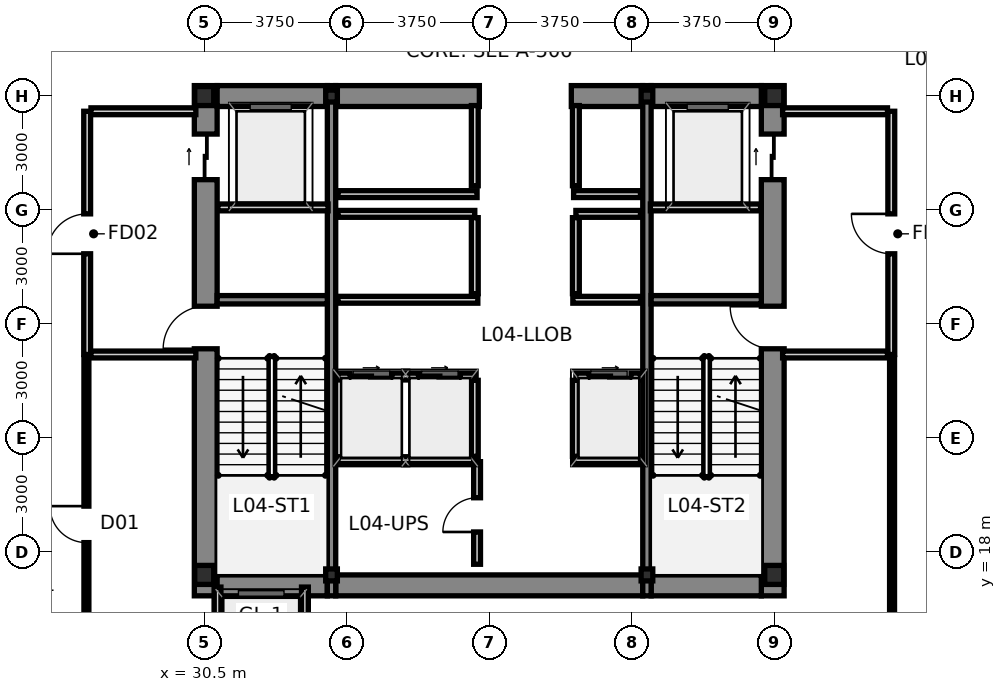
"""IFC4 building model, lengths in metres.
Left out: names, types, materials, properties, quantities, classifications, styles, units other than length and angle.
Written with IfcOpenShell. Run it as: python <this file> out.ifc"""

import sys

from ifc_helpers import new_model, si_unit, direction, frame, frame_2d, origin, origin_2d, place, context, subcontext, project, spatial, rectangle, i_section, extrude, source, transform, mapped, element, fill, save


model = new_model("IFC4")
c1 = context("Model", 3, precision=1e-05, world=origin(), true_north=direction((0.0, 1.0)))
c2 = subcontext(c1, "Body", "Model", "MODEL_VIEW")
j1 = project(units=[si_unit("LENGTHUNIT", "METRE"), si_unit("PLANEANGLEUNIT", "RADIAN")], contexts=[c1])
p1 = place(None, origin())
s1 = spatial("IfcSite", under=j1, at=p1, CompositionType="ELEMENT")
p2 = place(p1, origin())
s2 = spatial("IfcBuilding", under=s1, at=p2, CompositionType="ELEMENT")
p3 = place(p2, frame((0.0, 0.0, 18.9)))
s3 = spatial("IfcBuildingStorey", under=s2, at=p3, CompositionType="ELEMENT", Elevation=18.9)
m1 = source(origin(), c2, "Body", "SweptSolid", [
    extrude(i_section(OverallWidth=0.5, OverallDepth=0.5, WebThickness=0.028, FlangeThickness=0.04, at=origin_2d()), origin(), (0.0, 0.0, 1.0), 4.2),
])
for number, where, z_axis, x_axis in (
    (1, (30.5, 17.4, 0.0), (0.0, 0.0, 1.0), (1.0, 0.0, 0.0)),
    (2, (45.5, 17.4, 0.0), (0.0, 0.0, 1.0), (1.0, 0.0, 0.0)),
    (3, (45.5, 30.0, 0.0), (0.0, 0.0, 1.0), (1.0, 0.0, 0.0)),
    (4, (30.5, 30.0, 0.0), (0.0, 0.0, 1.0), (1.0, 0.0, 0.0)),
):
    element("IfcColumn", number, at=place(p3, frame(where, z_axis=z_axis, x_axis=x_axis)), inside=s3, PredefinedType="COLUMN", context=c2, shape_type="MappedRepresentation", body=[
        mapped(m1, transform((0.0, 0.0, 0.0), scale=1.0)),
    ])
m2 = source(origin(), c2, "Body", "SweptSolid", [
    extrude(i_section(OverallWidth=0.307, OverallDepth=0.315, WebThickness=0.012, FlangeThickness=0.019, at=origin_2d()), origin(), (0.0, 0.0, 1.0), 4.2),
])
for number, where, z_axis, x_axis in (
    (5, (33.85, 17.4, 0.0), (0.0, 0.0, 1.0), (1.0, 0.0, 0.0)),
    (6, (42.15, 17.4, 0.0), (0.0, 0.0, 1.0), (1.0, 0.0, 0.0)),
    (7, (33.85, 30.0, 0.0), (0.0, 0.0, 1.0), (1.0, 0.0, 0.0)),
    (8, (42.15, 30.0, 0.0), (0.0, 0.0, 1.0), (1.0, 0.0, 0.0)),
):
    element("IfcColumn", number, at=place(p3, frame(where, z_axis=z_axis, x_axis=x_axis)), inside=s3, PredefinedType="COLUMN", context=c2, shape_type="MappedRepresentation", body=[
        mapped(m2, transform((0.0, 0.0, 0.0), scale=1.0)),
    ])
p4 = place(p3, frame((30.54, 16.85, 0.0), z_axis=(0.0, 0.0, 1.0), x_axis=(0.0, 1.0, 0.0)))
e9 = element("IfcWall", 9, at=p4, inside=s3, PredefinedType="SHEAR", context=c2, shape_type="SweptSolid", body=[
    extrude(rectangle(XDim=13.425, YDim=0.6, at=frame_2d((6.712, 0.0))), origin(), (0.0, 0.0, 1.0), 4.2),
])
p5 = place(p4, frame((6.5, 0.0, 0.0)))
e10 = element("IfcOpeningElement", 10, at=p5, cuts=e9, PredefinedType="OPENING", context=c2, shape_type="SweptSolid", body=[
    extrude(rectangle(XDim=1.12, YDim=2.15, at=frame_2d((0.56, 1.075))), frame((0.0, 0.312, 0.0), z_axis=(0.0, -1.0, 0.0), x_axis=(1.0, 0.0, 0.0)), (0.0, 0.0, 1.0), 0.624),
])
p6 = place(p4, frame((10.95, 0.0, 0.0)))
e11 = element("IfcOpeningElement", 11, at=p6, cuts=e9, PredefinedType="OPENING", context=c2, shape_type="SweptSolid", body=[
    extrude(rectangle(XDim=1.2, YDim=2.2, at=frame_2d((0.6, 1.1))), frame((0.0, 0.312, 0.0), z_axis=(0.0, -1.0, 0.0), x_axis=(1.0, 0.0, 0.0)), (0.0, 0.0, 1.0), 0.624),
])
p7 = place(p3, frame((45.46, 16.85, 0.0), z_axis=(0.0, 0.0, 1.0), x_axis=(0.0, 1.0, 0.0)))
e12 = element("IfcWall", 12, at=p7, inside=s3, PredefinedType="SHEAR", context=c2, shape_type="SweptSolid", body=[
    extrude(rectangle(XDim=13.425, YDim=0.6, at=frame_2d((6.712, 0.0))), origin(), (0.0, 0.0, 1.0), 4.2),
])
p8 = place(p7, frame((6.5, 0.0, 0.0)))
e13 = element("IfcOpeningElement", 13, at=p8, cuts=e12, PredefinedType="OPENING", context=c2, shape_type="SweptSolid", body=[
    extrude(rectangle(XDim=1.12, YDim=2.15, at=frame_2d((0.56, 1.075))), frame((0.0, 0.312, 0.0), z_axis=(0.0, -1.0, 0.0), x_axis=(1.0, 0.0, 0.0)), (0.0, 0.0, 1.0), 0.624),
])
p9 = place(p7, frame((10.95, 0.0, 0.0)))
e14 = element("IfcOpeningElement", 14, at=p9, cuts=e12, PredefinedType="OPENING", context=c2, shape_type="SweptSolid", body=[
    extrude(rectangle(XDim=1.2, YDim=2.2, at=frame_2d((0.6, 1.1))), frame((0.0, 0.312, 0.0), z_axis=(0.0, -1.0, 0.0), x_axis=(1.0, 0.0, 0.0)), (0.0, 0.0, 1.0), 0.624),
])
p10 = place(p3, frame((30.84, 17.125, 0.0), z_axis=(0.0, 0.0, 1.0), x_axis=(1.0, 0.0, 0.0)))
e15 = element("IfcWall", 15, at=p10, inside=s3, PredefinedType="SHEAR", context=c2, shape_type="SweptSolid", body=[
    extrude(rectangle(XDim=2.9, YDim=0.55, at=frame_2d((1.45, 0.0))), origin(), (0.0, 0.0, 1.0), 4.2),
])
p11 = place(p3, frame((33.96, 17.125, 0.0), z_axis=(0.0, 0.0, 1.0), x_axis=(1.0, 0.0, 0.0)))
e16 = element("IfcWall", 16, at=p11, inside=s3, PredefinedType="SHEAR", context=c2, shape_type="SweptSolid", body=[
    extrude(rectangle(XDim=8.08, YDim=0.55, at=frame_2d((4.04, 0.0))), origin(), (0.0, 0.0, 1.0), 4.2),
])
for number, where, z_axis, x_axis in (
    (17, (42.26, 17.125, 0.0), (0.0, 0.0, 1.0), (1.0, 0.0, 0.0)),
    (18, (30.84, 30.0, 0.0), (0.0, 0.0, 1.0), (1.0, 0.0, 0.0)),
):
    element("IfcWall", number, at=place(p3, frame(where, z_axis=z_axis, x_axis=x_axis)), inside=s3, PredefinedType="SHEAR", context=c2, shape_type="SweptSolid", body=[
        extrude(rectangle(XDim=2.9, YDim=0.55, at=frame_2d((1.45, 0.0))), origin(), (0.0, 0.0, 1.0), 4.2),
    ])
p12 = place(p3, frame((33.96, 30.0, 0.0), z_axis=(0.0, 0.0, 1.0), x_axis=(1.0, 0.0, 0.0)))
e19 = element("IfcWall", 19, at=p12, inside=s3, PredefinedType="SHEAR", context=c2, shape_type="SweptSolid", body=[
    extrude(rectangle(XDim=3.78, YDim=0.55, at=frame_2d((1.89, 0.0))), origin(), (0.0, 0.0, 1.0), 4.2),
])
p13 = place(p3, frame((40.16, 30.0, 0.0), z_axis=(0.0, 0.0, 1.0), x_axis=(1.0, 0.0, 0.0)))
e20 = element("IfcWall", 20, at=p13, inside=s3, PredefinedType="SHEAR", context=c2, shape_type="SweptSolid", body=[
    extrude(rectangle(XDim=1.88, YDim=0.55, at=frame_2d((0.94, 0.0))), origin(), (0.0, 0.0, 1.0), 4.2),
])
p14 = place(p3, frame((42.26, 30.0, 0.0), z_axis=(0.0, 0.0, 1.0), x_axis=(1.0, 0.0, 0.0)))
e21 = element("IfcWall", 21, at=p14, inside=s3, PredefinedType="SHEAR", context=c2, shape_type="SweptSolid", body=[
    extrude(rectangle(XDim=2.9, YDim=0.55, at=frame_2d((1.45, 0.0))), origin(), (0.0, 0.0, 1.0), 4.2),
])
for number, where, z_axis, x_axis in (
    (22, (33.85, 16.85, 0.0), (0.0, 0.0, 1.0), (0.0, 1.0, 0.0)),
    (23, (42.15, 16.85, 0.0), (0.0, 0.0, 1.0), (0.0, 1.0, 0.0)),
):
    element("IfcWall", number, at=place(p3, frame(where, z_axis=z_axis, x_axis=x_axis)), inside=s3, PredefinedType="SHEAR", context=c2, shape_type="SweptSolid", body=[
        extrude(rectangle(XDim=13.425, YDim=0.22, at=frame_2d((6.712, 0.0))), origin(), (0.0, 0.0, 1.0), 4.2),
    ])
for number, where, z_axis, x_axis in (
    (24, (30.84, 24.64, 0.0), (0.0, 0.0, 1.0), (1.0, 0.0, 0.0)),
    (25, (42.26, 24.64, 0.0), (0.0, 0.0, 1.0), (1.0, 0.0, 0.0)),
):
    element("IfcWall", number, at=place(p3, frame(where, z_axis=z_axis, x_axis=x_axis)), inside=s3, PredefinedType="SHEAR", context=c2, shape_type="SweptSolid", body=[
        extrude(rectangle(XDim=2.9, YDim=0.22, at=frame_2d((1.45, 0.0))), origin(), (0.0, 0.0, 1.0), 4.2),
    ])
p15 = place(p3, frame((30.85, 14.42, 0.0), z_axis=(0.0, 0.0, 1.0), x_axis=(0.0, 1.0, 0.0)))
e26 = element("IfcWall", 26, at=p15, inside=s3, PredefinedType="PARTITIONING", context=c2, shape_type="SweptSolid", body=[
    extrude(rectangle(XDim=2.66, YDim=0.18, at=frame_2d((1.33, 0.0))), origin(), (0.0, 0.0, 1.0), 3.124),
])
p16 = place(p3, frame((33.15, 14.42, 0.0), z_axis=(0.0, 0.0, 1.0), x_axis=(0.0, 1.0, 0.0)))
e27 = element("IfcWall", 27, at=p16, inside=s3, PredefinedType="PARTITIONING", context=c2, shape_type="SweptSolid", body=[
    extrude(rectangle(XDim=2.66, YDim=0.18, at=frame_2d((1.33, 0.0))), origin(), (0.0, 0.0, 1.0), 3.75),
])
p17 = place(p3, frame((34.02, 22.62, 0.0), z_axis=(0.0, 0.0, 1.0), x_axis=(1.0, 0.0, 0.0)))
e28 = element("IfcWall", 28, at=p17, inside=s3, PredefinedType="PARTITIONING", context=c2, shape_type="SweptSolid", body=[
    extrude(rectangle(XDim=3.6, YDim=0.18, at=frame_2d((1.8, 0.0))), origin(), (0.0, 0.0, 1.0), 3.75),
])
p18 = place(p17, frame((0.32, 0.0, 0.0)))
e29 = element("IfcOpeningElement", 29, at=p18, cuts=e28, PredefinedType="OPENING", context=c2, shape_type="SweptSolid", body=[
    extrude(rectangle(XDim=1.1, YDim=2.2, at=frame_2d((0.55, 1.1))), frame((0.0, 0.102, 0.0), z_axis=(0.0, -1.0, 0.0), x_axis=(1.0, 0.0, 0.0)), (0.0, 0.0, 1.0), 0.204),
])
p19 = place(p17, frame((2.12, 0.0, 0.0)))
e30 = element("IfcOpeningElement", 30, at=p19, cuts=e28, PredefinedType="OPENING", context=c2, shape_type="SweptSolid", body=[
    extrude(rectangle(XDim=1.1, YDim=2.2, at=frame_2d((0.55, 1.1))), frame((0.0, 0.102, 0.0), z_axis=(0.0, -1.0, 0.0), x_axis=(1.0, 0.0, 0.0)), (0.0, 0.0, 1.0), 0.204),
])
p20 = place(p3, frame((40.28, 22.62, 0.0), z_axis=(0.0, 0.0, 1.0), x_axis=(1.0, 0.0, 0.0)))
e31 = element("IfcWall", 31, at=p20, inside=s3, PredefinedType="PARTITIONING", context=c2, shape_type="SweptSolid", body=[
    extrude(rectangle(XDim=1.7, YDim=0.18, at=frame_2d((0.85, 0.0))), origin(), (0.0, 0.0, 1.0), 3.75),
])
p21 = place(p20, frame((0.35, 0.0, 0.0)))
e32 = element("IfcOpeningElement", 32, at=p21, cuts=e31, PredefinedType="OPENING", context=c2, shape_type="SweptSolid", body=[
    extrude(rectangle(XDim=1.1, YDim=2.2, at=frame_2d((0.55, 1.1))), frame((0.0, 0.102, 0.0), z_axis=(0.0, -1.0, 0.0), x_axis=(1.0, 0.0, 0.0)), (0.0, 0.0, 1.0), 0.204),
])
for number, where, z_axis, x_axis in (
    (33, (37.62, 20.52, 0.0), (0.0, 0.0, 1.0), (0.0, 1.0, 0.0)),
    (34, (40.28, 20.52, 0.0), (0.0, 0.0, 1.0), (0.0, 1.0, 0.0)),
):
    element("IfcWall", number, at=place(p3, frame(where, z_axis=z_axis, x_axis=x_axis)), inside=s3, PredefinedType="PARTITIONING", context=c2, shape_type="SweptSolid", body=[
        extrude(rectangle(XDim=2.0, YDim=0.18, at=frame_2d((1.0, 0.0))), origin(), (0.0, 0.0, 1.0), 3.75),
    ])
p22 = place(p3, frame((34.02, 26.9, 0.0), z_axis=(0.0, 0.0, 1.0), x_axis=(1.0, 0.0, 0.0)))
e35 = element("IfcWall", 35, at=p22, inside=s3, PredefinedType="PARTITIONING", context=c2, shape_type="SweptSolid", body=[
    extrude(rectangle(XDim=3.6, YDim=0.18, at=frame_2d((1.8, 0.0))), origin(), (0.0, 0.0, 1.0), 3.75),
])
p23 = place(p3, frame((40.28, 26.9, 0.0), z_axis=(0.0, 0.0, 1.0), x_axis=(1.0, 0.0, 0.0)))
e36 = element("IfcWall", 36, at=p23, inside=s3, PredefinedType="PARTITIONING", context=c2, shape_type="SweptSolid", body=[
    extrude(rectangle(XDim=1.7, YDim=0.18, at=frame_2d((0.85, 0.0))), origin(), (0.0, 0.0, 1.0), 3.75),
])
for number, where, z_axis, x_axis in (
    (37, (37.62, 24.8, 0.0), (0.0, 0.0, 1.0), (0.0, 1.0, 0.0)),
    (38, (40.28, 24.8, 0.0), (0.0, 0.0, 1.0), (0.0, 1.0, 0.0)),
):
    element("IfcWall", number, at=place(p3, frame(where, z_axis=z_axis, x_axis=x_axis)), inside=s3, PredefinedType="PARTITIONING", context=c2, shape_type="SweptSolid", body=[
        extrude(rectangle(XDim=2.0, YDim=0.18, at=frame_2d((1.0, 0.0))), origin(), (0.0, 0.0, 1.0), 3.75),
    ])
p24 = place(p3, frame((34.02, 24.64, 0.0), z_axis=(0.0, 0.0, 1.0), x_axis=(1.0, 0.0, 0.0)))
e39 = element("IfcWall", 39, at=p24, inside=s3, PredefinedType="PARTITIONING", context=c2, shape_type="SweptSolid", body=[
    extrude(rectangle(XDim=3.68, YDim=0.18, at=frame_2d((1.84, 0.0))), origin(), (0.0, 0.0, 1.0), 3.75),
])
p25 = place(p3, frame((40.2, 24.64, 0.0), z_axis=(0.0, 0.0, 1.0), x_axis=(1.0, 0.0, 0.0)))
e40 = element("IfcWall", 40, at=p25, inside=s3, PredefinedType="PARTITIONING", context=c2, shape_type="SweptSolid", body=[
    extrude(rectangle(XDim=1.78, YDim=0.18, at=frame_2d((0.89, 0.0))), origin(), (0.0, 0.0, 1.0), 3.75),
])
p26 = place(p3, frame((34.02, 27.42, 0.0), z_axis=(0.0, 0.0, 1.0), x_axis=(1.0, 0.0, 0.0)))
e41 = element("IfcWall", 41, at=p26, inside=s3, PredefinedType="PARTITIONING", context=c2, shape_type="SweptSolid", body=[
    extrude(rectangle(XDim=3.66, YDim=0.18, at=frame_2d((1.83, 0.0))), origin(), (0.0, 0.0, 1.0), 3.75),
])
p27 = place(p3, frame((40.22, 27.42, 0.0), z_axis=(0.0, 0.0, 1.0), x_axis=(1.0, 0.0, 0.0)))
e42 = element("IfcWall", 42, at=p27, inside=s3, PredefinedType="PARTITIONING", context=c2, shape_type="SweptSolid", body=[
    extrude(rectangle(XDim=1.76, YDim=0.18, at=frame_2d((0.88, 0.0))), origin(), (0.0, 0.0, 1.0), 3.75),
])
for number, where, z_axis, x_axis in (
    (43, (37.62, 27.64, 0.0), (0.0, 0.0, 1.0), (0.0, 1.0, 0.0)),
    (44, (40.28, 27.64, 0.0), (0.0, 0.0, 1.0), (0.0, 1.0, 0.0)),
):
    element("IfcWall", number, at=place(p3, frame(where, z_axis=z_axis, x_axis=x_axis)), inside=s3, PredefinedType="PARTITIONING", context=c2, shape_type="SweptSolid", body=[
        extrude(rectangle(XDim=2.11, YDim=0.18, at=frame_2d((1.055, 0.0))), origin(), (0.0, 0.0, 1.0), 3.75),
    ])
p28 = place(p3, frame((27.42, 23.2, 0.0), z_axis=(0.0, 0.0, 1.0), x_axis=(0.0, 1.0, 0.0)))
e45 = element("IfcWall", 45, at=p28, inside=s3, PredefinedType="PARTITIONING", context=c2, shape_type="SweptSolid", body=[
    extrude(rectangle(XDim=6.4, YDim=0.18, at=frame_2d((3.2, 0.0))), origin(), (0.0, 0.0, 1.0), 3.376),
])
p29 = place(p28, frame((2.65, 0.0, 0.0)))
e46 = element("IfcOpeningElement", 46, at=p29, cuts=e45, PredefinedType="OPENING", context=c2, shape_type="SweptSolid", body=[
    extrude(rectangle(XDim=1.05, YDim=2.15, at=frame_2d((0.525, 1.075))), frame((0.0, 0.102, 0.0), z_axis=(0.0, -1.0, 0.0), x_axis=(1.0, 0.0, 0.0)), (0.0, 0.0, 1.0), 0.204),
])
p30 = place(p3, frame((27.52, 23.2, 0.0), z_axis=(0.0, 0.0, 1.0), x_axis=(1.0, 0.0, 0.0)))
e47 = element("IfcWall", 47, at=p30, inside=s3, PredefinedType="PARTITIONING", context=c2, shape_type="SweptSolid", body=[
    extrude(rectangle(XDim=2.76, YDim=0.18, at=frame_2d((1.38, 0.0))), origin(), (0.0, 0.0, 1.0), 3.75),
])
p31 = place(p3, frame((27.52, 29.6, 0.0), z_axis=(0.0, 0.0, 1.0), x_axis=(1.0, 0.0, 0.0)))
e48 = element("IfcWall", 48, at=p31, inside=s3, PredefinedType="PARTITIONING", context=c2, shape_type="SweptSolid", body=[
    extrude(rectangle(XDim=2.76, YDim=0.18, at=frame_2d((1.38, 0.0))), origin(), (0.0, 0.0, 1.0), 3.124),
])
p32 = place(p3, frame((48.58, 23.2, 0.0), z_axis=(0.0, 0.0, 1.0), x_axis=(0.0, 1.0, 0.0)))
e49 = element("IfcWall", 49, at=p32, inside=s3, PredefinedType="PARTITIONING", context=c2, shape_type="SweptSolid", body=[
    extrude(rectangle(XDim=6.4, YDim=0.18, at=frame_2d((3.2, 0.0))), origin(), (0.0, 0.0, 1.0), 3.75),
])
p33 = place(p32, frame((2.65, 0.0, 0.0)))
e50 = element("IfcOpeningElement", 50, at=p33, cuts=e49, PredefinedType="OPENING", context=c2, shape_type="SweptSolid", body=[
    extrude(rectangle(XDim=1.05, YDim=2.15, at=frame_2d((0.525, 1.075))), frame((0.0, 0.102, 0.0), z_axis=(0.0, -1.0, 0.0), x_axis=(1.0, 0.0, 0.0)), (0.0, 0.0, 1.0), 0.204),
])
p34 = place(p3, frame((45.72, 23.2, 0.0), z_axis=(0.0, 0.0, 1.0), x_axis=(1.0, 0.0, 0.0)))
e51 = element("IfcWall", 51, at=p34, inside=s3, PredefinedType="PARTITIONING", context=c2, shape_type="SweptSolid", body=[
    extrude(rectangle(XDim=2.76, YDim=0.18, at=frame_2d((1.38, 0.0))), origin(), (0.0, 0.0, 1.0), 3.75),
])
p35 = place(p3, frame((45.72, 29.6, 0.0), z_axis=(0.0, 0.0, 1.0), x_axis=(1.0, 0.0, 0.0)))
e52 = element("IfcWall", 52, at=p35, inside=s3, PredefinedType="PARTITIONING", context=c2, shape_type="SweptSolid", body=[
    extrude(rectangle(XDim=2.76, YDim=0.18, at=frame_2d((1.38, 0.0))), origin(), (0.0, 0.0, 1.0), 3.124),
])
for number, where, z_axis, x_axis in (
    (53, (30.86, 27.07, 0.0), (0.0, 0.0, 1.0), (1.0, 0.0, 0.0)),
    (54, (42.24, 27.07, 0.0), (0.0, 0.0, 1.0), (1.0, 0.0, 0.0)),
):
    element("IfcWall", number, at=place(p3, frame(where, z_axis=z_axis, x_axis=x_axis)), inside=s3, PredefinedType="PARTITIONING", context=c2, shape_type="SweptSolid", body=[
        extrude(rectangle(XDim=2.9, YDim=0.18, at=frame_2d((1.45, 0.0))), origin(), (0.0, 0.0, 1.0), 3.75),
    ])
p36 = place(p3, frame((34.02, 20.42, 0.0), z_axis=(0.0, 0.0, 1.0), x_axis=(1.0, 0.0, 0.0)))
e55 = element("IfcWall", 55, at=p36, inside=s3, PredefinedType="PARTITIONING", context=c2, shape_type="SweptSolid", body=[
    extrude(rectangle(XDim=3.64, YDim=0.18, at=frame_2d((1.82, 0.0))), origin(), (0.0, 0.0, 1.0), 3.75),
])
p37 = place(p3, frame((40.22, 20.42, 0.0), z_axis=(0.0, 0.0, 1.0), x_axis=(1.0, 0.0, 0.0)))
e56 = element("IfcWall", 56, at=p37, inside=s3, PredefinedType="PARTITIONING", context=c2, shape_type="SweptSolid", body=[
    extrude(rectangle(XDim=1.76, YDim=0.18, at=frame_2d((0.88, 0.0))), origin(), (0.0, 0.0, 1.0), 3.75),
])
p38 = place(p3, frame((37.68, 17.68, 0.0), z_axis=(0.0, 0.0, 1.0), x_axis=(0.0, 1.0, 0.0)))
e57 = element("IfcWall", 57, at=p38, inside=s3, PredefinedType="PARTITIONING", context=c2, shape_type="SweptSolid", body=[
    extrude(rectangle(XDim=2.7, YDim=0.18, at=frame_2d((1.35, 0.0))), origin(), (0.0, 0.0, 1.0), 3.75),
])
p39 = place(p38, frame((0.85, 0.0, 0.0)))
e58 = element("IfcOpeningElement", 58, at=p39, cuts=e57, PredefinedType="OPENING", context=c2, shape_type="SweptSolid", body=[
    extrude(rectangle(XDim=0.9, YDim=2.1, at=frame_2d((0.45, 1.05))), frame((0.0, 0.102, 0.0), z_axis=(0.0, -1.0, 0.0), x_axis=(1.0, 0.0, 0.0)), (0.0, 0.0, 1.0), 0.204),
])
p40 = place(p3, frame((27.4, 14.355, 0.0), z_axis=(0.0, 0.0, 1.0), x_axis=(0.0, 1.0, 0.0)))
e59 = element("IfcWall", 59, at=p40, inside=s3, PredefinedType="PARTITIONING", context=c2, shape_type="SweptSolid", body=[
    extrude(rectangle(XDim=8.75, YDim=0.13, at=frame_2d((4.375, 0.0))), origin(), (0.0, 0.0, 1.0), 3.376),
])
p41 = place(p40, frame((3.895, 0.0, 0.0)))
e60 = element("IfcOpeningElement", 60, at=p41, cuts=e59, PredefinedType="OPENING", context=c2, shape_type="SweptSolid", body=[
    extrude(rectangle(XDim=0.96, YDim=2.15, at=frame_2d((0.48, 1.075))), frame((0.0, 0.077, 0.0), z_axis=(0.0, -1.0, 0.0), x_axis=(1.0, 0.0, 0.0)), (0.0, 0.0, 1.0), 0.154),
])
p42 = place(p3, frame((48.6, 14.355, 0.0), z_axis=(0.0, 0.0, 1.0), x_axis=(0.0, 1.0, 0.0)))
e61 = element("IfcWall", 61, at=p42, inside=s3, PredefinedType="PARTITIONING", context=c2, shape_type="SweptSolid", body=[
    extrude(rectangle(XDim=8.75, YDim=0.13, at=frame_2d((4.375, 0.0))), origin(), (0.0, 0.0, 1.0), 3.75),
])
p43 = place(p5, origin())
e62 = element("IfcDoor", 62, at=p43, inside=s3, OperationType="SINGLE_SWING_LEFT", PredefinedType="DOOR", context=c2, shape_type="SweptSolid", body=[
    extrude(rectangle(XDim=1.12, YDim=2.15, at=frame_2d((0.56, 1.075))), frame((0.0, 0.025, 0.0), z_axis=(0.0, -1.0, 0.0), x_axis=(1.0, 0.0, 0.0)), (0.0, 0.0, 1.0), 0.05),
])
fill(e10, e62)
p44 = place(p6, origin())
e63 = element("IfcDoor", 63, at=p44, inside=s3, OperationType="SLIDING_TO_LEFT", PredefinedType="DOOR", context=c2, shape_type="SweptSolid", body=[
    extrude(rectangle(XDim=1.2, YDim=2.2, at=frame_2d((0.6, 1.1))), frame((0.0, 0.025, 0.0), z_axis=(0.0, -1.0, 0.0), x_axis=(1.0, 0.0, 0.0)), (0.0, 0.0, 1.0), 0.05),
])
fill(e11, e63)
p45 = place(p8, origin())
e64 = element("IfcDoor", 64, at=p45, inside=s3, OperationType="SINGLE_SWING_RIGHT", PredefinedType="DOOR", context=c2, shape_type="SweptSolid", body=[
    extrude(rectangle(XDim=1.12, YDim=2.15, at=frame_2d((0.56, 1.075))), frame((0.0, 0.025, 0.0), z_axis=(0.0, -1.0, 0.0), x_axis=(1.0, 0.0, 0.0)), (0.0, 0.0, 1.0), 0.05),
])
fill(e13, e64)
p46 = place(p9, origin())
e65 = element("IfcDoor", 65, at=p46, inside=s3, OperationType="SLIDING_TO_RIGHT", PredefinedType="DOOR", context=c2, shape_type="SweptSolid", body=[
    extrude(rectangle(XDim=1.2, YDim=2.2, at=frame_2d((0.6, 1.1))), frame((0.0, 0.025, 0.0), z_axis=(0.0, -1.0, 0.0), x_axis=(1.0, 0.0, 0.0)), (0.0, 0.0, 1.0), 0.05),
])
fill(e14, e65)
p47 = place(p18, origin())
e66 = element("IfcDoor", 66, at=p47, inside=s3, OperationType="SLIDING_TO_LEFT", PredefinedType="DOOR", context=c2, shape_type="SweptSolid", body=[
    extrude(rectangle(XDim=1.1, YDim=2.2, at=frame_2d((0.55, 1.1))), frame((0.0, 0.025, 0.0), z_axis=(0.0, -1.0, 0.0), x_axis=(1.0, 0.0, 0.0)), (0.0, 0.0, 1.0), 0.05),
])
fill(e29, e66)
p48 = place(p19, origin())
e67 = element("IfcDoor", 67, at=p48, inside=s3, OperationType="SLIDING_TO_RIGHT", PredefinedType="DOOR", context=c2, shape_type="SweptSolid", body=[
    extrude(rectangle(XDim=1.1, YDim=2.2, at=frame_2d((0.55, 1.1))), frame((0.0, 0.025, 0.0), z_axis=(0.0, -1.0, 0.0), x_axis=(1.0, 0.0, 0.0)), (0.0, 0.0, 1.0), 0.05),
])
fill(e30, e67)
p49 = place(p21, origin())
e68 = element("IfcDoor", 68, at=p49, inside=s3, OperationType="SLIDING_TO_LEFT", PredefinedType="DOOR", context=c2, shape_type="SweptSolid", body=[
    extrude(rectangle(XDim=1.1, YDim=2.2, at=frame_2d((0.55, 1.1))), frame((0.0, 0.025, 0.0), z_axis=(0.0, -1.0, 0.0), x_axis=(1.0, 0.0, 0.0)), (0.0, 0.0, 1.0), 0.05),
])
fill(e32, e68)
p50 = place(p29, origin())
e69 = element("IfcDoor", 69, at=p50, inside=s3, OperationType="SINGLE_SWING_LEFT", PredefinedType="DOOR", context=c2, shape_type="SweptSolid", body=[
    extrude(rectangle(XDim=1.05, YDim=2.15, at=frame_2d((0.525, 1.075))), frame((0.0, 0.025, 0.0), z_axis=(0.0, -1.0, 0.0), x_axis=(1.0, 0.0, 0.0)), (0.0, 0.0, 1.0), 0.05),
])
fill(e46, e69)
p51 = place(p33, origin())
e70 = element("IfcDoor", 70, at=p51, inside=s3, OperationType="SINGLE_SWING_RIGHT", PredefinedType="DOOR", context=c2, shape_type="SweptSolid", body=[
    extrude(rectangle(XDim=1.05, YDim=2.15, at=frame_2d((0.525, 1.075))), frame((0.0, 0.025, 0.0), z_axis=(0.0, -1.0, 0.0), x_axis=(1.0, 0.0, 0.0)), (0.0, 0.0, 1.0), 0.05),
])
fill(e50, e70)
p52 = place(p39, origin())
e71 = element("IfcDoor", 71, at=p52, inside=s3, OperationType="SINGLE_SWING_LEFT", PredefinedType="DOOR", context=c2, shape_type="SweptSolid", body=[
    extrude(rectangle(XDim=0.9, YDim=2.1, at=frame_2d((0.45, 1.05))), frame((0.0, 0.025, 0.0), z_axis=(0.0, -1.0, 0.0), x_axis=(1.0, 0.0, 0.0)), (0.0, 0.0, 1.0), 0.05),
])
fill(e58, e71)
p53 = place(p41, origin())
e72 = element("IfcDoor", 72, at=p53, inside=s3, OperationType="SINGLE_SWING_RIGHT", PredefinedType="DOOR", context=c2, shape_type="SweptSolid", body=[
    extrude(rectangle(XDim=0.96, YDim=2.15, at=frame_2d((0.48, 1.075))), frame((0.0, 0.025, 0.0), z_axis=(0.0, -1.0, 0.0), x_axis=(1.0, 0.0, 0.0)), (0.0, 0.0, 1.0), 0.05),
])
fill(e60, e72)
save(model, sys.argv[1])
